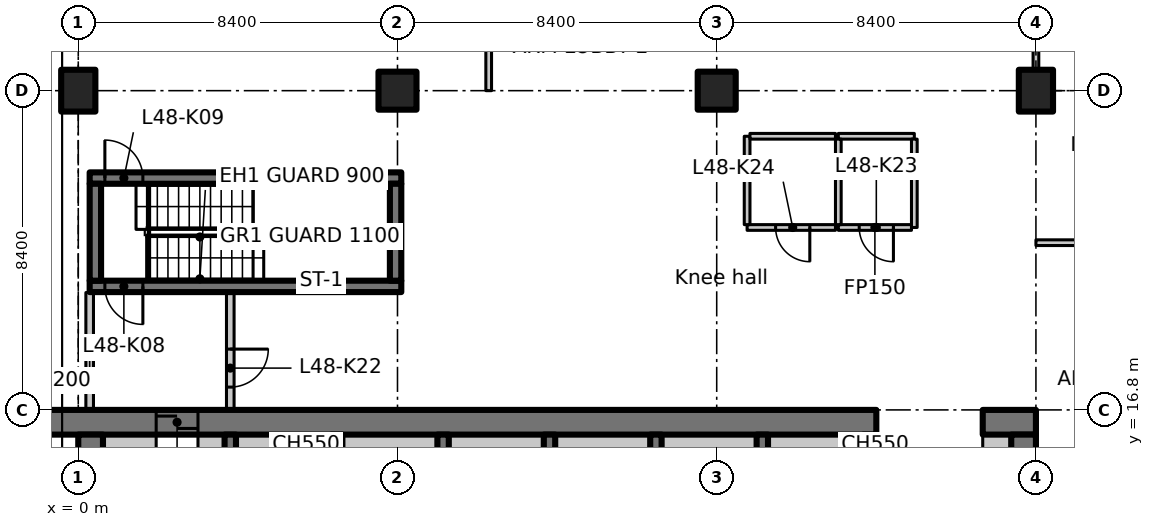
"""IFC4 building model, lengths in metres.
Left out: names, types, materials, properties, quantities, classifications, styles, units other than length and angle.
Written with IfcOpenShell. Run it as: python <this file> out.ifc"""

import sys

from ifc_helpers import new_model, si_unit, direction, frame, frame_2d, origin, origin_2d, place, context, subcontext, project, spatial, polyline, rectangle, outline, extrude, element, fill, save


model = new_model("IFC4")
c1 = context("Model", 3, precision=1e-05, world=origin(), true_north=direction((0.0, 1.0)))
c2 = subcontext(c1, "Body", "Model", "MODEL_VIEW")
j1 = project(units=[si_unit("LENGTHUNIT", "METRE"), si_unit("PLANEANGLEUNIT", "RADIAN")], contexts=[c1])
p1 = place(None, origin())
s1 = spatial("IfcSite", under=j1, at=p1, CompositionType="ELEMENT")
p2 = place(p1, origin())
s2 = spatial("IfcBuilding", under=s1, at=p2, CompositionType="ELEMENT")
p3 = place(p2, frame((0.0, 0.0, 192.0)))
s3 = spatial("IfcBuildingStorey", under=s2, at=p3, CompositionType="ELEMENT", Elevation=192.0)
p4 = place(p3, frame((0.0, 25.2, 0.0), z_axis=(0.0, 0.0, 1.0), x_axis=(1.0, 0.0, 0.0)))
e1 = element("IfcColumn", 1, at=p4, inside=s3, PredefinedType="COLUMN", context=c2, shape_type="SweptSolid", body=[
    extrude(rectangle(XDim=0.9, YDim=1.1, at=origin_2d()), origin(), (0.0, 0.0, 1.0), 3.35),
])
for number, where, z_axis, x_axis in (
    (2, (8.4, 25.2, 0.0), (0.0, 0.0, 1.0), (1.0, 0.0, 0.0)),
    (3, (16.8, 25.2, 0.0), (0.0, 0.0, 1.0), (1.0, 0.0, 0.0)),
):
    element("IfcColumn", number, at=place(p3, frame(where, z_axis=z_axis, x_axis=x_axis)), inside=s3, PredefinedType="COLUMN", context=c2, shape_type="SweptSolid", body=[
        extrude(rectangle(XDim=1.0, YDim=1.0, at=origin_2d()), origin(), (0.0, 0.0, 1.0), 3.35),
    ])
p5 = place(p3, frame((25.2, 25.2, 0.0), z_axis=(0.0, 0.0, 1.0), x_axis=(1.0, 0.0, 0.0)))
e4 = element("IfcColumn", 4, at=p5, inside=s3, PredefinedType="COLUMN", context=c2, shape_type="SweptSolid", body=[
    extrude(rectangle(XDim=0.9, YDim=1.1, at=origin_2d()), origin(), (0.0, 0.0, 1.0), 3.35),
])
p6 = place(p3, frame((-1.1, 16.475, 0.0), z_axis=(0.0, 0.0, 1.0), x_axis=(1.0, 0.0, 0.0)))
e5 = element("IfcWall", 5, at=p6, inside=s3, PredefinedType="SHEAR", context=c2, shape_type="SweptSolid", body=[
    extrude(rectangle(XDim=22.1, YDim=0.65, at=frame_2d((11.05, 0.0))), origin(), (0.0, 0.0, 1.0), 3.35),
])
p7 = place(p6, frame((3.15, 0.0, 0.0)))
e6 = element("IfcOpeningElement", 6, at=p7, cuts=e5, PredefinedType="OPENING", context=c2, shape_type="SweptSolid", body=[
    extrude(rectangle(XDim=1.1, YDim=2.3, at=frame_2d((0.55, 1.15))), frame((0.0, 0.335, 0.0), z_axis=(0.0, -1.0, 0.0), x_axis=(1.0, 0.0, 0.0)), (0.0, 0.0, 1.0), 0.67),
])
p8 = place(p3, frame((23.8, 16.475, 0.0), z_axis=(0.0, 0.0, 1.0), x_axis=(1.0, 0.0, 0.0)))
e7 = element("IfcWall", 7, at=p8, inside=s3, PredefinedType="SHEAR", context=c2, shape_type="SweptSolid", body=[
    extrude(rectangle(XDim=1.4, YDim=0.65, at=frame_2d((0.7, 0.0))), origin(), (0.0, 0.0, 1.0), 3.35),
])
p9 = place(p3, frame((0.325, 7.286, 0.0), z_axis=(0.0, 0.0, 1.0), x_axis=(0.0, 1.0, 0.0)))
e8 = element("IfcWall", 8, at=p9, inside=s3, PredefinedType="SHEAR", context=c2, shape_type="SweptSolid", body=[
    extrude(rectangle(XDim=8.864, YDim=0.65, at=frame_2d((4.432, 0.0))), origin(), (0.0, 0.0, 1.0), 3.35),
])
p10 = place(p3, frame((24.875, 12.6, 0.0), z_axis=(0.0, 0.0, 1.0), x_axis=(0.0, 1.0, 0.0)))
e9 = element("IfcWall", 9, at=p10, inside=s3, PredefinedType="SHEAR", context=c2, shape_type="SweptSolid", body=[
    extrude(rectangle(XDim=3.55, YDim=0.65, at=frame_2d((1.775, 0.0))), origin(), (0.0, 0.0, 1.0), 3.35),
])
p11 = place(p3, frame((0.65, 15.875, 0.0), z_axis=(0.0, 0.0, 1.0), x_axis=(1.0, 0.0, 0.0)))
e10 = element("IfcWall", 10, at=p11, inside=s3, PredefinedType="PARTITIONING", context=c2, shape_type="SweptSolid", body=[
    extrude(rectangle(XDim=1.4, YDim=0.55, at=frame_2d((0.7, 0.0))), origin(), (0.0, 0.0, 1.0), 3.35),
])
p12 = place(p3, frame((23.8, 15.875, 0.0), z_axis=(0.0, 0.0, 1.0), x_axis=(1.0, 0.0, 0.0)))
e11 = element("IfcWall", 11, at=p12, inside=s3, PredefinedType="PARTITIONING", context=c2, shape_type="SweptSolid", body=[
    extrude(rectangle(XDim=0.75, YDim=0.55, at=frame_2d((0.375, 0.0))), origin(), (0.0, 0.0, 1.0), 3.35),
])
for number, where, z_axis, x_axis in (
    (12, (4.0, 12.95, 0.0), (0.0, 0.0, 1.0), (0.0, 1.0, 0.0)),
    (13, (6.8, 12.95, 0.0), (0.0, 0.0, 1.0), (0.0, 1.0, 0.0)),
    (14, (9.6, 12.95, 0.0), (0.0, 0.0, 1.0), (0.0, 1.0, 0.0)),
    (15, (12.4, 12.95, 0.0), (0.0, 0.0, 1.0), (0.0, 1.0, 0.0)),
    (16, (15.2, 12.95, 0.0), (0.0, 0.0, 1.0), (0.0, 1.0, 0.0)),
    (17, (18.0, 12.95, 0.0), (0.0, 0.0, 1.0), (0.0, 1.0, 0.0)),
    (18, (20.8, 12.95, 0.0), (0.0, 0.0, 1.0), (0.0, 1.0, 0.0)),
):
    element("IfcWall", number, at=place(p3, frame(where, z_axis=z_axis, x_axis=x_axis)), inside=s3, PredefinedType="SHEAR", context=c2, shape_type="SweptSolid", body=[
        extrude(rectangle(XDim=3.2, YDim=0.3, at=frame_2d((1.6, 0.0))), origin(), (0.0, 0.0, 1.0), 3.35),
    ])
p13 = place(p3, frame((8.5, 20.05, 0.0), z_axis=(0.0, 0.0, 1.0), x_axis=(-1.0, 0.0, 0.0)))
e19 = element("IfcWall", 19, at=p13, inside=s3, PredefinedType="SHEAR", context=c2, shape_type="SweptSolid", body=[
    extrude(rectangle(XDim=8.2, YDim=0.3, at=frame_2d((4.1, 0.0))), origin(), (0.0, 0.0, 1.0), 3.35),
])
p14 = place(p13, frame((6.8, 0.0, 0.0)))
e20 = element("IfcOpeningElement", 20, at=p14, cuts=e19, PredefinedType="OPENING", context=c2, shape_type="SweptSolid", body=[
    extrude(rectangle(XDim=1.0, YDim=2.1, at=frame_2d((0.5, 1.05))), frame((0.0, 0.16, 0.0), z_axis=(0.0, -1.0, 0.0), x_axis=(1.0, 0.0, 0.0)), (0.0, 0.0, 1.0), 0.32),
])
p15 = place(p3, frame((0.3, 22.9, 0.0), z_axis=(0.0, 0.0, 1.0), x_axis=(1.0, 0.0, 0.0)))
e21 = element("IfcWall", 21, at=p15, inside=s3, PredefinedType="SHEAR", context=c2, shape_type="SweptSolid", body=[
    extrude(rectangle(XDim=8.2, YDim=0.3, at=frame_2d((4.1, 0.0))), origin(), (0.0, 0.0, 1.0), 3.35),
])
p16 = place(p15, frame((0.4, 0.0, 0.0)))
e22 = element("IfcOpeningElement", 22, at=p16, cuts=e21, PredefinedType="OPENING", context=c2, shape_type="SweptSolid", body=[
    extrude(rectangle(XDim=1.0, YDim=2.1, at=frame_2d((0.5, 1.05))), frame((0.0, 0.16, 0.0), z_axis=(0.0, -1.0, 0.0), x_axis=(1.0, 0.0, 0.0)), (0.0, 0.0, 1.0), 0.32),
])
for number, where, z_axis, x_axis in (
    (23, (0.45, 20.2, 0.0), (0.0, 0.0, 1.0), (0.0, 1.0, 0.0)),
    (24, (8.35, 20.2, 0.0), (0.0, 0.0, 1.0), (0.0, 1.0, 0.0)),
):
    element("IfcWall", number, at=place(p3, frame(where, z_axis=z_axis, x_axis=x_axis)), inside=s3, PredefinedType="SHEAR", context=c2, shape_type="SweptSolid", body=[
        extrude(rectangle(XDim=2.55, YDim=0.3, at=frame_2d((1.275, 0.0))), origin(), (0.0, 0.0, 1.0), 3.35),
    ])
p17 = place(p3, frame((0.3, 16.812, 0.0), z_axis=(0.0, 0.0, 1.0), x_axis=(0.0, 1.0, 0.0)))
e25 = element("IfcWall", 25, at=p17, inside=s3, PredefinedType="PARTITIONING", context=c2, shape_type="SweptSolid", body=[
    extrude(rectangle(XDim=3.076, YDim=0.2, at=frame_2d((1.538, 0.0))), origin(), (0.0, 0.0, 1.0), 2.98),
])
p18 = place(p3, frame((4.0, 19.888, 0.0), z_axis=(0.0, 0.0, 1.0), x_axis=(0.0, -1.0, 0.0)))
e26 = element("IfcWall", 26, at=p18, inside=s3, PredefinedType="PARTITIONING", context=c2, shape_type="SweptSolid", body=[
    extrude(rectangle(XDim=3.076, YDim=0.2, at=frame_2d((1.538, 0.0))), origin(), (0.0, 0.0, 1.0), 3.35),
])
p19 = place(p18, frame((1.488, 0.0, 0.0)))
e27 = element("IfcOpeningElement", 27, at=p19, cuts=e26, PredefinedType="OPENING", context=c2, shape_type="SweptSolid", body=[
    extrude(rectangle(XDim=1.0, YDim=2.1, at=frame_2d((0.5, 1.05))), frame((0.0, 0.11, 0.0), z_axis=(0.0, -1.0, 0.0), x_axis=(1.0, 0.0, 0.0)), (0.0, 0.0, 1.0), 0.22),
])
p20 = place(p3, frame((20.0, 24.0, 0.0), z_axis=(0.0, 0.0, 1.0), x_axis=(1.0, 0.0, 0.0)))
e28 = element("IfcWall", 28, at=p20, inside=s3, PredefinedType="PARTITIONING", context=c2, shape_type="SweptSolid", body=[
    extrude(rectangle(XDim=2.0, YDim=0.15, at=frame_2d((1.0, 0.0))), origin(), (0.0, 0.0, 1.0), 3.35),
])
p21 = place(p3, frame((22.0, 23.925, 0.0), z_axis=(0.0, 0.0, 1.0), x_axis=(0.0, -1.0, 0.0)))
e29 = element("IfcWall", 29, at=p21, inside=s3, PredefinedType="PARTITIONING", context=c2, shape_type="SweptSolid", body=[
    extrude(rectangle(XDim=2.325, YDim=0.15, at=frame_2d((1.163, 0.0))), origin(), (0.0, 0.0, 1.0), 3.35),
])
p22 = place(p3, frame((21.925, 21.6, 0.0), z_axis=(0.0, 0.0, 1.0), x_axis=(-1.0, 0.0, 0.0)))
e30 = element("IfcWall", 30, at=p22, inside=s3, PredefinedType="PARTITIONING", context=c2, shape_type="SweptSolid", body=[
    extrude(rectangle(XDim=1.925, YDim=0.15, at=frame_2d((0.962, 0.0))), origin(), (0.0, 0.0, 1.0), 3.35),
])
p23 = place(p22, frame((0.475, 0.0, 0.0)))
e31 = element("IfcOpeningElement", 31, at=p23, cuts=e30, PredefinedType="OPENING", context=c2, shape_type="SweptSolid", body=[
    extrude(rectangle(XDim=0.9, YDim=2.1, at=frame_2d((0.45, 1.05))), frame((0.0, 0.085, 0.0), z_axis=(0.0, -1.0, 0.0), x_axis=(1.0, 0.0, 0.0)), (0.0, 0.0, 1.0), 0.17),
])
p24 = place(p3, frame((20.0, 21.675, 0.0), z_axis=(0.0, 0.0, 1.0), x_axis=(0.0, 1.0, 0.0)))
e32 = element("IfcWall", 32, at=p24, inside=s3, PredefinedType="PARTITIONING", context=c2, shape_type="SweptSolid", body=[
    extrude(rectangle(XDim=2.25, YDim=0.15, at=frame_2d((1.125, 0.0))), origin(), (0.0, 0.0, 1.0), 3.35),
])
p25 = place(p3, frame((19.925, 21.6, 0.0), z_axis=(0.0, 0.0, 1.0), x_axis=(-1.0, 0.0, 0.0)))
e33 = element("IfcWall", 33, at=p25, inside=s3, PredefinedType="PARTITIONING", context=c2, shape_type="SweptSolid", body=[
    extrude(rectangle(XDim=2.325, YDim=0.15, at=frame_2d((1.163, 0.0))), origin(), (0.0, 0.0, 1.0), 3.35),
])
p26 = place(p25, frame((0.675, 0.0, 0.0)))
e34 = element("IfcOpeningElement", 34, at=p26, cuts=e33, PredefinedType="OPENING", context=c2, shape_type="SweptSolid", body=[
    extrude(rectangle(XDim=0.9, YDim=2.1, at=frame_2d((0.45, 1.05))), frame((0.0, 0.085, 0.0), z_axis=(0.0, -1.0, 0.0), x_axis=(1.0, 0.0, 0.0)), (0.0, 0.0, 1.0), 0.17),
])
p27 = place(p3, frame((17.6, 21.675, 0.0), z_axis=(0.0, 0.0, 1.0), x_axis=(0.0, 1.0, 0.0)))
e35 = element("IfcWall", 35, at=p27, inside=s3, PredefinedType="PARTITIONING", context=c2, shape_type="SweptSolid", body=[
    extrude(rectangle(XDim=2.325, YDim=0.15, at=frame_2d((1.163, 0.0))), origin(), (0.0, 0.0, 1.0), 3.35),
])
p28 = place(p3, frame((17.675, 24.0, 0.0), z_axis=(0.0, 0.0, 1.0), x_axis=(1.0, 0.0, 0.0)))
e36 = element("IfcWall", 36, at=p28, inside=s3, PredefinedType="PARTITIONING", context=c2, shape_type="SweptSolid", body=[
    extrude(rectangle(XDim=2.25, YDim=0.15, at=frame_2d((1.125, 0.0))), origin(), (0.0, 0.0, 1.0), 3.35),
])
p29 = place(p3, frame((3.15, 15.875, 0.0), z_axis=(0.0, 0.0, 1.0), x_axis=(1.0, 0.0, 0.0)))
e37 = element("IfcWall", 37, at=p29, inside=s3, PredefinedType="PARTITIONING", context=c2, shape_type="SweptSolid", body=[
    extrude(rectangle(XDim=0.7, YDim=0.55, at=frame_2d((0.35, 0.0))), origin(), (0.0, 0.0, 1.0), 3.35),
])
for number, where, z_axis, x_axis in (
    (38, (4.15, 15.875, 0.0), (0.0, 0.0, 1.0), (1.0, 0.0, 0.0)),
    (39, (6.95, 15.875, 0.0), (0.0, 0.0, 1.0), (1.0, 0.0, 0.0)),
    (40, (9.75, 15.875, 0.0), (0.0, 0.0, 1.0), (1.0, 0.0, 0.0)),
    (41, (12.55, 15.875, 0.0), (0.0, 0.0, 1.0), (1.0, 0.0, 0.0)),
    (42, (15.35, 15.875, 0.0), (0.0, 0.0, 1.0), (1.0, 0.0, 0.0)),
    (43, (18.15, 15.875, 0.0), (0.0, 0.0, 1.0), (1.0, 0.0, 0.0)),
):
    element("IfcWall", number, at=place(p3, frame(where, z_axis=z_axis, x_axis=x_axis)), inside=s3, PredefinedType="PARTITIONING", context=c2, shape_type="SweptSolid", body=[
        extrude(rectangle(XDim=2.5, YDim=0.55, at=frame_2d((1.25, 0.0))), origin(), (0.0, 0.0, 1.0), 3.35),
    ])
p30 = place(p3, frame((20.95, 15.875, 0.0), z_axis=(0.0, 0.0, 1.0), x_axis=(1.0, 0.0, 0.0)))
e44 = element("IfcWall", 44, at=p30, inside=s3, PredefinedType="PARTITIONING", context=c2, shape_type="SweptSolid", body=[
    extrude(rectangle(XDim=0.05, YDim=0.55, at=frame_2d((0.025, 0.0))), origin(), (0.0, 0.0, 1.0), 3.35),
])
p31 = place(p3, frame((25.2, 21.2, 0.0), z_axis=(0.0, 0.0, 1.0), x_axis=(1.0, 0.0, 0.0)))
e45 = element("IfcWall", 45, at=p31, inside=s3, PredefinedType="PARTITIONING", context=c2, shape_type="SweptSolid", body=[
    extrude(rectangle(XDim=4.2, YDim=0.15, at=frame_2d((2.1, 0.0))), origin(), (0.0, 0.0, 1.0), 3.33),
])
p32 = place(p3, frame((25.2, 31.0, 0.0), z_axis=(0.0, 0.0, 1.0), x_axis=(0.0, -1.0, 0.0)))
e46 = element("IfcWall", 46, at=p32, inside=s3, PredefinedType="PARTITIONING", context=c2, shape_type="SweptSolid", body=[
    extrude(outline(polyline([(0.0, 0.0), (5.23, 0.0), (5.23, 2.98), (0.0, 2.98), (0.0, 0.0)])), frame((0.0, 0.075, 0.0), z_axis=(0.0, -1.0, 0.0), x_axis=(1.0, 0.0, 0.0)), (0.0, 0.0, 1.0), 0.15),
])
p33 = place(p32, frame((2.03, 0.0, 0.0)))
e47 = element("IfcOpeningElement", 47, at=p33, cuts=e46, PredefinedType="OPENING", context=c2, shape_type="SweptSolid", body=[
    extrude(rectangle(XDim=1.1, YDim=2.1, at=frame_2d((0.55, 1.05))), frame((0.0, 0.085, 0.0), z_axis=(0.0, -1.0, 0.0), x_axis=(1.0, 0.0, 0.0)), (0.0, 0.0, 1.0), 0.17),
])
p34 = place(p3, frame((10.8, 25.2, 0.0), z_axis=(0.0, 0.0, 1.0), x_axis=(0.0, 1.0, 0.0)))
e48 = element("IfcWall", 48, at=p34, inside=s3, PredefinedType="PARTITIONING", context=c2, shape_type="SweptSolid", body=[
    extrude(rectangle(XDim=8.4, YDim=0.15, at=frame_2d((4.2, 0.0))), origin(), (0.0, 0.0, 1.0), 3.33),
])
p35 = place(p34, frame((3.3, 0.0, 0.0)))
e49 = element("IfcOpeningElement", 49, at=p35, cuts=e48, PredefinedType="OPENING", context=c2, shape_type="SweptSolid", body=[
    extrude(rectangle(XDim=1.6, YDim=2.1, at=frame_2d((0.8, 1.05))), frame((0.0, 0.085, 0.0), z_axis=(0.0, -1.0, 0.0), x_axis=(1.0, 0.0, 0.0)), (0.0, 0.0, 1.0), 0.17),
])
p36 = place(p7, origin())
e50 = element("IfcDoor", 50, at=p36, inside=s3, OperationType="SLIDING_TO_LEFT", PredefinedType="DOOR", context=c2, shape_type="SweptSolid", body=[
    extrude(rectangle(XDim=1.1, YDim=2.3, at=frame_2d((0.55, 1.15))), frame((0.0, 0.025, 0.0), z_axis=(0.0, -1.0, 0.0), x_axis=(1.0, 0.0, 0.0)), (0.0, 0.0, 1.0), 0.05),
])
fill(e6, e50)
p37 = place(p14, origin())
e51 = element("IfcDoor", 51, at=p37, inside=s3, OperationType="SINGLE_SWING_LEFT", PredefinedType="DOOR", context=c2, shape_type="SweptSolid", body=[
    extrude(rectangle(XDim=1.0, YDim=2.1, at=frame_2d((0.5, 1.05))), frame((0.0, 0.025, 0.0), z_axis=(0.0, -1.0, 0.0), x_axis=(1.0, 0.0, 0.0)), (0.0, 0.0, 1.0), 0.05),
])
fill(e20, e51)
p38 = place(p16, origin())
e52 = element("IfcDoor", 52, at=p38, inside=s3, OperationType="SINGLE_SWING_RIGHT", PredefinedType="DOOR", context=c2, shape_type="SweptSolid", body=[
    extrude(rectangle(XDim=1.0, YDim=2.1, at=frame_2d((0.5, 1.05))), frame((0.0, 0.025, 0.0), z_axis=(0.0, -1.0, 0.0), x_axis=(1.0, 0.0, 0.0)), (0.0, 0.0, 1.0), 0.05),
])
fill(e22, e52)
p39 = place(p19, origin())
e53 = element("IfcDoor", 53, at=p39, inside=s3, OperationType="SINGLE_SWING_LEFT", PredefinedType="DOOR", context=c2, shape_type="SweptSolid", body=[
    extrude(rectangle(XDim=1.0, YDim=2.1, at=frame_2d((0.5, 1.05))), frame((0.0, 0.025, 0.0), z_axis=(0.0, -1.0, 0.0), x_axis=(1.0, 0.0, 0.0)), (0.0, 0.0, 1.0), 0.05),
])
fill(e27, e53)
p40 = place(p23, origin())
e54 = element("IfcDoor", 54, at=p40, inside=s3, OperationType="SINGLE_SWING_RIGHT", PredefinedType="DOOR", context=c2, shape_type="SweptSolid", body=[
    extrude(rectangle(XDim=0.9, YDim=2.1, at=frame_2d((0.45, 1.05))), frame((0.0, 0.025, 0.0), z_axis=(0.0, -1.0, 0.0), x_axis=(1.0, 0.0, 0.0)), (0.0, 0.0, 1.0), 0.05),
])
fill(e31, e54)
p41 = place(p26, origin())
e55 = element("IfcDoor", 55, at=p41, inside=s3, OperationType="SINGLE_SWING_LEFT", PredefinedType="DOOR", context=c2, shape_type="SweptSolid", body=[
    extrude(rectangle(XDim=0.9, YDim=2.1, at=frame_2d((0.45, 1.05))), frame((0.0, 0.025, 0.0), z_axis=(0.0, -1.0, 0.0), x_axis=(1.0, 0.0, 0.0)), (0.0, 0.0, 1.0), 0.05),
])
fill(e34, e55)
save(model, sys.argv[1])
